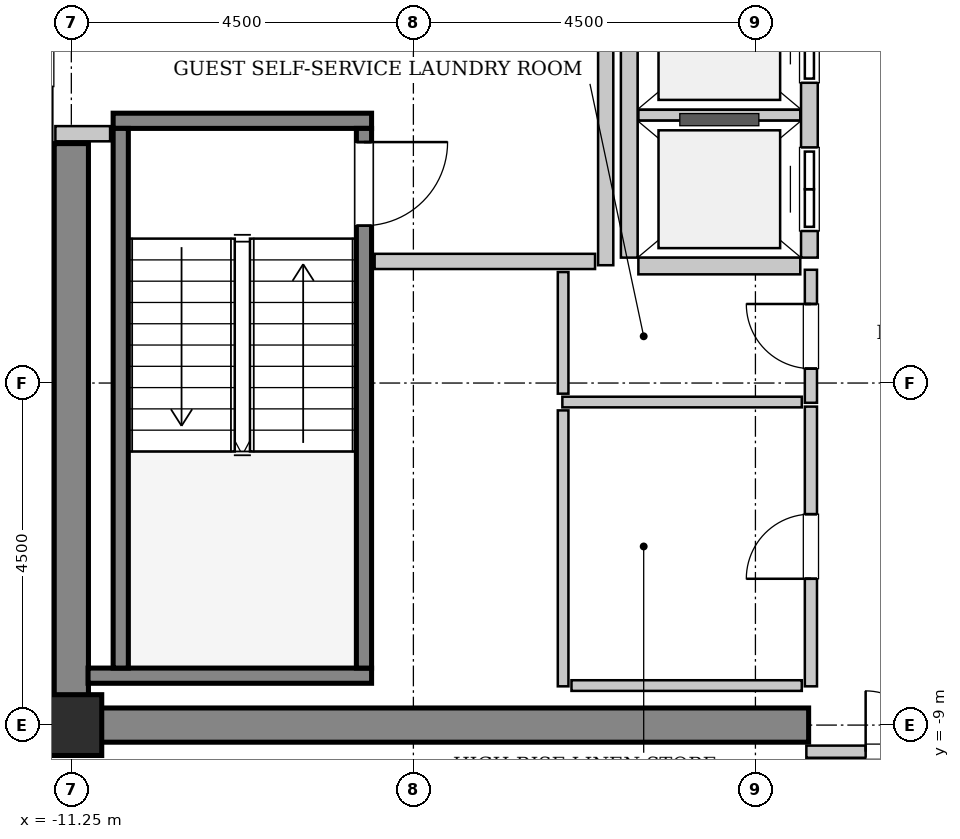
"""IFC4 building model, lengths in metres.
Left out: names, types, materials, properties, quantities, classifications, styles, units other than length and angle.
Written with IfcOpenShell. Run it as: python <this file> out.ifc"""

import sys

from ifc_helpers import new_model, si_unit, direction, frame, frame_2d, origin, origin_2d, place, context, subcontext, project, spatial, rectangle, hollow_rectangle, extrude, source, transform, mapped, element, fill, save


model = new_model("IFC4")
c1 = context("Model", 3, precision=1e-05, world=origin(), true_north=direction((0.0, 1.0)))
c2 = subcontext(c1, "Body", "Model", "MODEL_VIEW")
j1 = project(units=[si_unit("LENGTHUNIT", "METRE"), si_unit("PLANEANGLEUNIT", "RADIAN")], contexts=[c1])
p1 = place(None, origin())
s1 = spatial("IfcSite", under=j1, at=p1, CompositionType="ELEMENT")
p2 = place(p1, origin())
s2 = spatial("IfcBuilding", under=s1, at=p2, CompositionType="ELEMENT")
p3 = place(p2, frame((0.0, 0.0, 283.6)))
s3 = spatial("IfcBuildingStorey", under=s2, at=p3, CompositionType="ELEMENT", Elevation=283.6)
m1 = source(origin(), c2, "Body", "SweptSolid", [
    extrude(rectangle(XDim=9.925, YDim=0.45, at=frame_2d((4.962, 0.0))), origin(), (0.0, 0.0, 1.0), 3.8),
])
p4 = place(p3, frame((-11.475, -9.0, 0.0), z_axis=(0.0, 0.0, 1.0), x_axis=(1.0, 0.0, 0.0)))
e1 = element("IfcWall", 1, at=p4, inside=s3, PredefinedType="SHEAR", context=c2, shape_type="MappedRepresentation", body=[
    mapped(m1, transform((0.0, 0.0, 0.0), x_axis=(1.0, 0.0, 0.0), y_axis=(0.0, 1.0, 0.0), z_axis=(0.0, 0.0, 1.0), scale=1.0)),
])
m2 = source(origin(), c2, "Body", "SweptSolid", [
    extrude(rectangle(XDim=7.425, YDim=0.45, at=frame_2d((3.712, 0.0))), origin(), (0.0, 0.0, 1.0), 3.8),
])
p5 = place(p3, frame((-11.25, -8.775, 0.0), z_axis=(0.0, 0.0, 1.0), x_axis=(0.0, 1.0, 0.0)))
e2 = element("IfcWall", 2, at=p5, inside=s3, PredefinedType="SHEAR", context=c2, shape_type="MappedRepresentation", body=[
    mapped(m2, transform((0.0, 0.0, 0.0), x_axis=(1.0, 0.0, 0.0), y_axis=(0.0, 1.0, 0.0), z_axis=(0.0, 0.0, 1.0), scale=1.0)),
])
m3 = source(origin(), c2, "Body", "SweptSolid", [
    extrude(hollow_rectangle(XDim=0.8, YDim=0.8, WallThickness=0.04, InnerFilletRadius=0.04, OuterFilletRadius=0.08, at=origin_2d()), origin(), (0.0, 0.0, 1.0), 3.8),
])
p6 = place(p3, frame((-11.25, -9.0, 0.0), z_axis=(0.0, 0.0, 1.0), x_axis=(1.0, 0.0, 0.0)))
e3 = element("IfcColumn", 3, at=p6, inside=s3, PredefinedType="COLUMN", context=c2, shape_type="MappedRepresentation", body=[
    mapped(m3, transform((0.0, 0.0, 0.0), x_axis=(1.0, 0.0, 0.0), y_axis=(0.0, 1.0, 0.0), z_axis=(0.0, 0.0, 1.0), scale=1.0)),
])
m4 = source(origin(), c2, "Body", "SweptSolid", [
    extrude(rectangle(XDim=3.4, YDim=0.2, at=frame_2d((1.7, 0.0))), origin(), (0.0, 0.0, 1.0), 3.8),
])
p7 = place(p3, frame((-10.7, -1.05, 0.0), z_axis=(0.0, 0.0, 1.0), x_axis=(1.0, 0.0, 0.0)))
e4 = element("IfcWall", 4, at=p7, inside=s3, PredefinedType="SOLIDWALL", context=c2, shape_type="MappedRepresentation", body=[
    mapped(m4, transform((0.0, 0.0, 0.0), x_axis=(1.0, 0.0, 0.0), y_axis=(0.0, 1.0, 0.0), z_axis=(0.0, 0.0, 1.0), scale=1.0)),
])
m5 = source(origin(), c2, "Body", "SweptSolid", [
    extrude(rectangle(XDim=3.73, YDim=0.2, at=frame_2d((1.865, 0.0))), origin(), (0.0, 0.0, 1.0), 3.8),
])
p8 = place(p3, frame((-11.03, -8.35, 0.0), z_axis=(0.0, 0.0, 1.0), x_axis=(1.0, 0.0, 0.0)))
e5 = element("IfcWall", 5, at=p8, inside=s3, PredefinedType="SOLIDWALL", context=c2, shape_type="MappedRepresentation", body=[
    mapped(m5, transform((0.0, 0.0, 0.0), x_axis=(1.0, 0.0, 0.0), y_axis=(0.0, 1.0, 0.0), z_axis=(0.0, 0.0, 1.0), scale=1.0)),
])
m6 = source(origin(), c2, "Body", "SweptSolid", [
    extrude(rectangle(XDim=7.1, YDim=0.2, at=frame_2d((3.55, 0.0))), origin(), (0.0, 0.0, 1.0), 3.8),
])
p9 = place(p3, frame((-10.6, -1.15, 0.0), z_axis=(0.0, 0.0, 1.0), x_axis=(0.0, -1.0, 0.0)))
e6 = element("IfcWall", 6, at=p9, inside=s3, PredefinedType="SOLIDWALL", context=c2, shape_type="MappedRepresentation", body=[
    mapped(m6, transform((0.0, 0.0, 0.0), x_axis=(1.0, 0.0, 0.0), y_axis=(0.0, 1.0, 0.0), z_axis=(0.0, 0.0, 1.0), scale=1.0)),
])
p10 = place(p3, frame((-7.4, -1.15, 0.0), z_axis=(0.0, 0.0, 1.0), x_axis=(0.0, -1.0, 0.0)))
e7 = element("IfcWall", 7, at=p10, inside=s3, PredefinedType="SOLIDWALL", context=c2, shape_type="MappedRepresentation", body=[
    mapped(m6, transform((0.0, 0.0, 0.0), x_axis=(1.0, 0.0, 0.0), y_axis=(0.0, 1.0, 0.0), z_axis=(0.0, 0.0, 1.0), scale=1.0)),
])
p11 = place(p10, frame((0.18, 0.0, 0.0)))
e8 = element("IfcOpeningElement", 8, at=p11, cuts=e7, PredefinedType="OPENING", context=c2, shape_type="SweptSolid", body=[
    extrude(rectangle(XDim=1.1, YDim=2.15, at=frame_2d((0.55, 1.075))), frame((0.0, 0.11, 0.0), z_axis=(0.0, -1.0, 0.0), x_axis=(1.0, 0.0, 0.0)), (0.0, 0.0, 1.0), 0.22),
])
m7 = source(origin(), c2, "Body", "SweptSolid", [
    extrude(rectangle(XDim=5.7, YDim=0.22, at=frame_2d((2.85, 0.0))), origin(), (0.0, 0.0, 1.0), 3.535),
])
p12 = place(p3, frame((-1.54, -2.85, 0.0), z_axis=(0.0, 0.0, 1.0), x_axis=(0.0, 1.0, 0.0)))
e9 = element("IfcWall", 9, at=p12, inside=s3, PredefinedType="SOLIDWALL", context=c2, shape_type="MappedRepresentation", body=[
    mapped(m7, transform((0.0, 0.0, 0.0), x_axis=(1.0, 0.0, 0.0), y_axis=(0.0, 1.0, 0.0), z_axis=(0.0, 0.0, 1.0), scale=1.0)),
])
p13 = place(p12, frame((0.35, 0.0, 0.0)))
e10 = element("IfcOpeningElement", 10, at=p13, cuts=e9, PredefinedType="OPENING", context=c2, shape_type="SweptSolid", body=[
    extrude(rectangle(XDim=1.1, YDim=2.2, at=frame_2d((0.55, 1.1))), frame((0.0, 0.12, 0.0), z_axis=(0.0, -1.0, 0.0), x_axis=(1.0, 0.0, 0.0)), (0.0, 0.0, 1.0), 0.24),
])
p14 = place(p12, frame((2.3, 0.0, 0.0)))
e11 = element("IfcOpeningElement", 11, at=p14, cuts=e9, PredefinedType="OPENING", context=c2, shape_type="SweptSolid", body=[
    extrude(rectangle(XDim=1.1, YDim=2.2, at=frame_2d((0.55, 1.1))), frame((0.0, 0.12, 0.0), z_axis=(0.0, -1.0, 0.0), x_axis=(1.0, 0.0, 0.0)), (0.0, 0.0, 1.0), 0.24),
])
p15 = place(p12, frame((4.25, 0.0, 0.0)))
e12 = element("IfcOpeningElement", 12, at=p15, cuts=e9, PredefinedType="OPENING", context=c2, shape_type="SweptSolid", body=[
    extrude(rectangle(XDim=1.1, YDim=2.2, at=frame_2d((0.55, 1.1))), frame((0.0, 0.12, 0.0), z_axis=(0.0, -1.0, 0.0), x_axis=(1.0, 0.0, 0.0)), (0.0, 0.0, 1.0), 0.24),
])
p16 = place(p3, frame((-3.91, 2.85, 0.0), z_axis=(0.0, 0.0, 1.0), x_axis=(0.0, -1.0, 0.0)))
e13 = element("IfcWall", 13, at=p16, inside=s3, PredefinedType="SOLIDWALL", context=c2, shape_type="MappedRepresentation", body=[
    mapped(m7, transform((0.0, 0.0, 0.0), x_axis=(1.0, 0.0, 0.0), y_axis=(0.0, 1.0, 0.0), z_axis=(0.0, 0.0, 1.0), scale=1.0)),
])
m8 = source(origin(), c2, "Body", "SweptSolid", [
    extrude(rectangle(XDim=2.13, YDim=0.22, at=frame_2d((1.065, 0.0))), origin(), (0.0, 0.0, 1.0), 3.535),
])
p17 = place(p3, frame((-3.79, -2.96, 0.0), z_axis=(0.0, 0.0, 1.0), x_axis=(1.0, 0.0, 0.0)))
e14 = element("IfcWall", 14, at=p17, inside=s3, PredefinedType="SOLIDWALL", context=c2, shape_type="MappedRepresentation", body=[
    mapped(m8, transform((0.0, 0.0, 0.0), x_axis=(1.0, 0.0, 0.0), y_axis=(0.0, 1.0, 0.0), z_axis=(0.0, 0.0, 1.0), scale=1.0)),
])
m9 = source(origin(), c2, "Body", "SweptSolid", [
    extrude(rectangle(XDim=2.13, YDim=0.14, at=frame_2d((1.065, 0.0))), origin(), (0.0, 0.0, 1.0), 3.535),
])
p18 = place(p3, frame((-3.79, -0.975, 0.0), z_axis=(0.0, 0.0, 1.0), x_axis=(1.0, 0.0, 0.0)))
e15 = element("IfcWall", 15, at=p18, inside=s3, PredefinedType="PARTITIONING", context=c2, shape_type="MappedRepresentation", body=[
    mapped(m9, transform((0.0, 0.0, 0.0), x_axis=(1.0, 0.0, 0.0), y_axis=(0.0, 1.0, 0.0), z_axis=(0.0, 0.0, 1.0), scale=1.0)),
])
m10 = source(origin(), c2, "Body", "SweptSolid", [
    extrude(rectangle(XDim=5.9, YDim=0.2, at=frame_2d((2.95, 0.0))), origin(), (0.0, 0.0, 1.0), 3.535),
])
p19 = place(p3, frame((-4.22, -2.95, 0.0), z_axis=(0.0, 0.0, 1.0), x_axis=(0.0, 1.0, 0.0)))
e16 = element("IfcWall", 16, at=p19, inside=s3, PredefinedType="PARTITIONING", context=c2, shape_type="MappedRepresentation", body=[
    mapped(m10, transform((0.0, 0.0, 0.0), x_axis=(1.0, 0.0, 0.0), y_axis=(0.0, 1.0, 0.0), z_axis=(0.0, 0.0, 1.0), scale=1.0)),
])
m11 = source(origin(), c2, "Body", "SweptSolid", [
    extrude(rectangle(XDim=2.9, YDim=0.2, at=frame_2d((1.45, 0.0))), origin(), (0.0, 0.0, 1.0), 3.535),
])
p20 = place(p3, frame((-7.26, -2.9, 0.0), z_axis=(0.0, 0.0, 1.0), x_axis=(1.0, 0.0, 0.0)))
e17 = element("IfcWall", 17, at=p20, inside=s3, PredefinedType="PARTITIONING", context=c2, shape_type="MappedRepresentation", body=[
    mapped(m11, transform((0.0, 0.0, 0.0), x_axis=(1.0, 0.0, 0.0), y_axis=(0.0, 1.0, 0.0), z_axis=(0.0, 0.0, 1.0), scale=1.0)),
])
m12 = source(origin(), c2, "Body", "SweptSolid", [
    extrude(rectangle(XDim=0.72, YDim=0.2, at=frame_2d((0.36, 0.0))), origin(), (0.0, 0.0, 1.0), 3.535),
])
p21 = place(p3, frame((-11.46, -1.22, 0.0), z_axis=(0.0, 0.0, 1.0), x_axis=(1.0, 0.0, 0.0)))
e18 = element("IfcWall", 18, at=p21, inside=s3, PredefinedType="PARTITIONING", context=c2, shape_type="MappedRepresentation", body=[
    mapped(m12, transform((0.0, 0.0, 0.0), x_axis=(1.0, 0.0, 0.0), y_axis=(0.0, 1.0, 0.0), z_axis=(0.0, 0.0, 1.0), scale=1.0)),
])
m13 = source(origin(), c2, "Body", "SweptSolid", [
    extrude(rectangle(XDim=3.16, YDim=0.16, at=frame_2d((1.58, 0.0))), origin(), (0.0, 0.0, 1.0), 2.625),
])
p22 = place(p3, frame((-1.58, -9.35, 0.0), z_axis=(0.0, 0.0, 1.0), x_axis=(1.0, 0.0, 0.0)))
e19 = element("IfcWall", 19, at=p22, inside=s3, PredefinedType="PARTITIONING", context=c2, shape_type="MappedRepresentation", body=[
    mapped(m13, transform((0.0, 0.0, 0.0), x_axis=(1.0, 0.0, 0.0), y_axis=(0.0, 1.0, 0.0), z_axis=(0.0, 0.0, 1.0), scale=1.0)),
])
p23 = place(p22, frame((0.78, 0.0, 0.0)))
e20 = element("IfcOpeningElement", 20, at=p23, cuts=e19, PredefinedType="OPENING", context=c2, shape_type="SweptSolid", body=[
    extrude(rectangle(XDim=1.6, YDim=2.3, at=frame_2d((0.8, 1.15))), frame((0.0, 0.09, 0.0), z_axis=(0.0, -1.0, 0.0), x_axis=(1.0, 0.0, 0.0)), (0.0, 0.0, 1.0), 0.18),
])
m14 = source(origin(), c2, "Body", "SweptSolid", [
    extrude(rectangle(XDim=1.75, YDim=0.16, at=frame_2d((0.875, 0.0))), origin(), (0.0, 0.0, 1.0), 3.535),
])
p24 = place(p3, frame((-1.52, -4.76, 0.0), z_axis=(0.0, 0.0, 1.0), x_axis=(0.0, 1.0, 0.0)))
e21 = element("IfcWall", 21, at=p24, inside=s3, PredefinedType="PARTITIONING", context=c2, shape_type="MappedRepresentation", body=[
    mapped(m14, transform((0.0, 0.0, 0.0), x_axis=(1.0, 0.0, 0.0), y_axis=(0.0, 1.0, 0.0), z_axis=(0.0, 0.0, 1.0), scale=1.0)),
])
p25 = place(p24, frame((0.45, 0.0, 0.0)))
e22 = element("IfcOpeningElement", 22, at=p25, cuts=e21, PredefinedType="OPENING", context=c2, shape_type="SweptSolid", body=[
    extrude(rectangle(XDim=0.85, YDim=2.1, at=frame_2d((0.425, 1.05))), frame((0.0, 0.09, 0.0), z_axis=(0.0, -1.0, 0.0), x_axis=(1.0, 0.0, 0.0)), (0.0, 0.0, 1.0), 0.18),
])
m15 = source(origin(), c2, "Body", "SweptSolid", [
    extrude(rectangle(XDim=3.15, YDim=0.14, at=frame_2d((1.575, 0.0))), origin(), (0.0, 0.0, 1.0), 3.535),
])
p26 = place(p3, frame((-4.79, -4.75, 0.0), z_axis=(0.0, 0.0, 1.0), x_axis=(1.0, 0.0, 0.0)))
e23 = element("IfcWall", 23, at=p26, inside=s3, PredefinedType="PARTITIONING", context=c2, shape_type="MappedRepresentation", body=[
    mapped(m15, transform((0.0, 0.0, 0.0), x_axis=(1.0, 0.0, 0.0), y_axis=(0.0, 1.0, 0.0), z_axis=(0.0, 0.0, 1.0), scale=1.0)),
])
m16 = source(origin(), c2, "Body", "SweptSolid", [
    extrude(rectangle(XDim=1.6, YDim=0.14, at=frame_2d((0.8, 0.0))), origin(), (0.0, 0.0, 1.0), 3.535),
])
p27 = place(p3, frame((-4.78, -4.64, 0.0), z_axis=(0.0, 0.0, 1.0), x_axis=(0.0, 1.0, 0.0)))
e24 = element("IfcWall", 24, at=p27, inside=s3, PredefinedType="PARTITIONING", context=c2, shape_type="MappedRepresentation", body=[
    mapped(m16, transform((0.0, 0.0, 0.0), x_axis=(1.0, 0.0, 0.0), y_axis=(0.0, 1.0, 0.0), z_axis=(0.0, 0.0, 1.0), scale=1.0)),
])
m17 = source(origin(), c2, "Body", "SweptSolid", [
    extrude(rectangle(XDim=3.68, YDim=0.16, at=frame_2d((1.84, 0.0))), origin(), (0.0, 0.0, 1.0), 3.535),
])
p28 = place(p3, frame((-1.52, -8.49, 0.0), z_axis=(0.0, 0.0, 1.0), x_axis=(0.0, 1.0, 0.0)))
e25 = element("IfcWall", 25, at=p28, inside=s3, PredefinedType="PARTITIONING", context=c2, shape_type="MappedRepresentation", body=[
    mapped(m17, transform((0.0, 0.0, 0.0), x_axis=(1.0, 0.0, 0.0), y_axis=(0.0, 1.0, 0.0), z_axis=(0.0, 0.0, 1.0), scale=1.0)),
])
p29 = place(p28, frame((1.415, 0.0, 0.0)))
e26 = element("IfcOpeningElement", 26, at=p29, cuts=e25, PredefinedType="OPENING", context=c2, shape_type="SweptSolid", body=[
    extrude(rectangle(XDim=0.85, YDim=2.1, at=frame_2d((0.425, 1.05))), frame((0.0, 0.09, 0.0), z_axis=(0.0, -1.0, 0.0), x_axis=(1.0, 0.0, 0.0)), (0.0, 0.0, 1.0), 0.18),
])
m18 = source(origin(), c2, "Body", "SweptSolid", [
    extrude(rectangle(XDim=3.63, YDim=0.14, at=frame_2d((1.815, 0.0))), origin(), (0.0, 0.0, 1.0), 3.535),
])
p30 = place(p3, frame((-4.78, -8.49, 0.0), z_axis=(0.0, 0.0, 1.0), x_axis=(0.0, 1.0, 0.0)))
e27 = element("IfcWall", 27, at=p30, inside=s3, PredefinedType="PARTITIONING", context=c2, shape_type="MappedRepresentation", body=[
    mapped(m18, transform((0.0, 0.0, 0.0), x_axis=(1.0, 0.0, 0.0), y_axis=(0.0, 1.0, 0.0), z_axis=(0.0, 0.0, 1.0), scale=1.0)),
])
m19 = source(origin(), c2, "Body", "SweptSolid", [
    extrude(rectangle(XDim=3.03, YDim=0.14, at=frame_2d((1.515, 0.0))), origin(), (0.0, 0.0, 1.0), 3.535),
])
p31 = place(p3, frame((-4.67, -8.48, 0.0), z_axis=(0.0, 0.0, 1.0), x_axis=(1.0, 0.0, 0.0)))
e28 = element("IfcWall", 28, at=p31, inside=s3, PredefinedType="PARTITIONING", context=c2, shape_type="MappedRepresentation", body=[
    mapped(m19, transform((0.0, 0.0, 0.0), x_axis=(1.0, 0.0, 0.0), y_axis=(0.0, 1.0, 0.0), z_axis=(0.0, 0.0, 1.0), scale=1.0)),
])
m20 = source(origin(), c2, "Body", "SweptSolid", [
    extrude(rectangle(XDim=1.1, YDim=2.15, at=frame_2d((0.55, 1.075))), frame((0.0, 0.025, 0.0), z_axis=(0.0, -1.0, 0.0), x_axis=(1.0, 0.0, 0.0)), (0.0, 0.0, 1.0), 0.05),
])
p32 = place(p11, origin())
e29 = element("IfcDoor", 29, at=p32, inside=s3, OperationType="SINGLE_SWING_LEFT", PredefinedType="DOOR", context=c2, shape_type="MappedRepresentation", body=[
    mapped(m20, transform((0.0, 0.0, 0.0), x_axis=(1.0, 0.0, 0.0), y_axis=(0.0, 1.0, 0.0), z_axis=(0.0, 0.0, 1.0), scale=1.0)),
])
fill(e8, e29)
m21 = source(origin(), c2, "Body", "SweptSolid", [
    extrude(rectangle(XDim=1.1, YDim=2.2, at=frame_2d((0.55, 1.1))), frame((0.0, 0.025, 0.0), z_axis=(0.0, -1.0, 0.0), x_axis=(1.0, 0.0, 0.0)), (0.0, 0.0, 1.0), 0.05),
])
p33 = place(p13, origin())
e30 = element("IfcDoor", 30, at=p33, inside=s3, OperationType="DOUBLE_DOOR_SLIDING", PredefinedType="DOOR", context=c2, shape_type="MappedRepresentation", body=[
    mapped(m21, transform((0.0, 0.0, 0.0), x_axis=(1.0, 0.0, 0.0), y_axis=(0.0, 1.0, 0.0), z_axis=(0.0, 0.0, 1.0), scale=1.0)),
])
fill(e10, e30)
p34 = place(p14, origin())
e31 = element("IfcDoor", 31, at=p34, inside=s3, OperationType="DOUBLE_DOOR_SLIDING", PredefinedType="DOOR", context=c2, shape_type="MappedRepresentation", body=[
    mapped(m21, transform((0.0, 0.0, 0.0), x_axis=(1.0, 0.0, 0.0), y_axis=(0.0, 1.0, 0.0), z_axis=(0.0, 0.0, 1.0), scale=1.0)),
])
fill(e11, e31)
m22 = source(origin(), c2, "Body", "SweptSolid", [
    extrude(rectangle(XDim=1.6, YDim=2.3, at=frame_2d((0.8, 1.15))), frame((0.0, 0.025, 0.0), z_axis=(0.0, -1.0, 0.0), x_axis=(1.0, 0.0, 0.0)), (0.0, 0.0, 1.0), 0.05),
])
p35 = place(p23, origin())
e32 = element("IfcDoor", 32, at=p35, inside=s3, OperationType="DOUBLE_DOOR_SINGLE_SWING", PredefinedType="DOOR", context=c2, shape_type="MappedRepresentation", body=[
    mapped(m22, transform((0.0, 0.0, 0.0), x_axis=(1.0, 0.0, 0.0), y_axis=(0.0, 1.0, 0.0), z_axis=(0.0, 0.0, 1.0), scale=1.0)),
])
fill(e20, e32)
m23 = source(origin(), c2, "Body", "SweptSolid", [
    extrude(rectangle(XDim=0.85, YDim=2.1, at=frame_2d((0.425, 1.05))), frame((0.0, 0.025, 0.0), z_axis=(0.0, -1.0, 0.0), x_axis=(1.0, 0.0, 0.0)), (0.0, 0.0, 1.0), 0.05),
])
p36 = place(p25, origin())
e33 = element("IfcDoor", 33, at=p36, inside=s3, OperationType="SINGLE_SWING_RIGHT", PredefinedType="DOOR", context=c2, shape_type="MappedRepresentation", body=[
    mapped(m23, transform((0.0, 0.0, 0.0), x_axis=(1.0, 0.0, 0.0), y_axis=(0.0, 1.0, 0.0), z_axis=(0.0, 0.0, 1.0), scale=1.0)),
])
fill(e22, e33)
p37 = place(p29, origin())
e34 = element("IfcDoor", 34, at=p37, inside=s3, OperationType="SINGLE_SWING_LEFT", PredefinedType="DOOR", context=c2, shape_type="MappedRepresentation", body=[
    mapped(m23, transform((0.0, 0.0, 0.0), x_axis=(1.0, 0.0, 0.0), y_axis=(0.0, 1.0, 0.0), z_axis=(0.0, 0.0, 1.0), scale=1.0)),
])
fill(e26, e34)
save(model, sys.argv[1])
